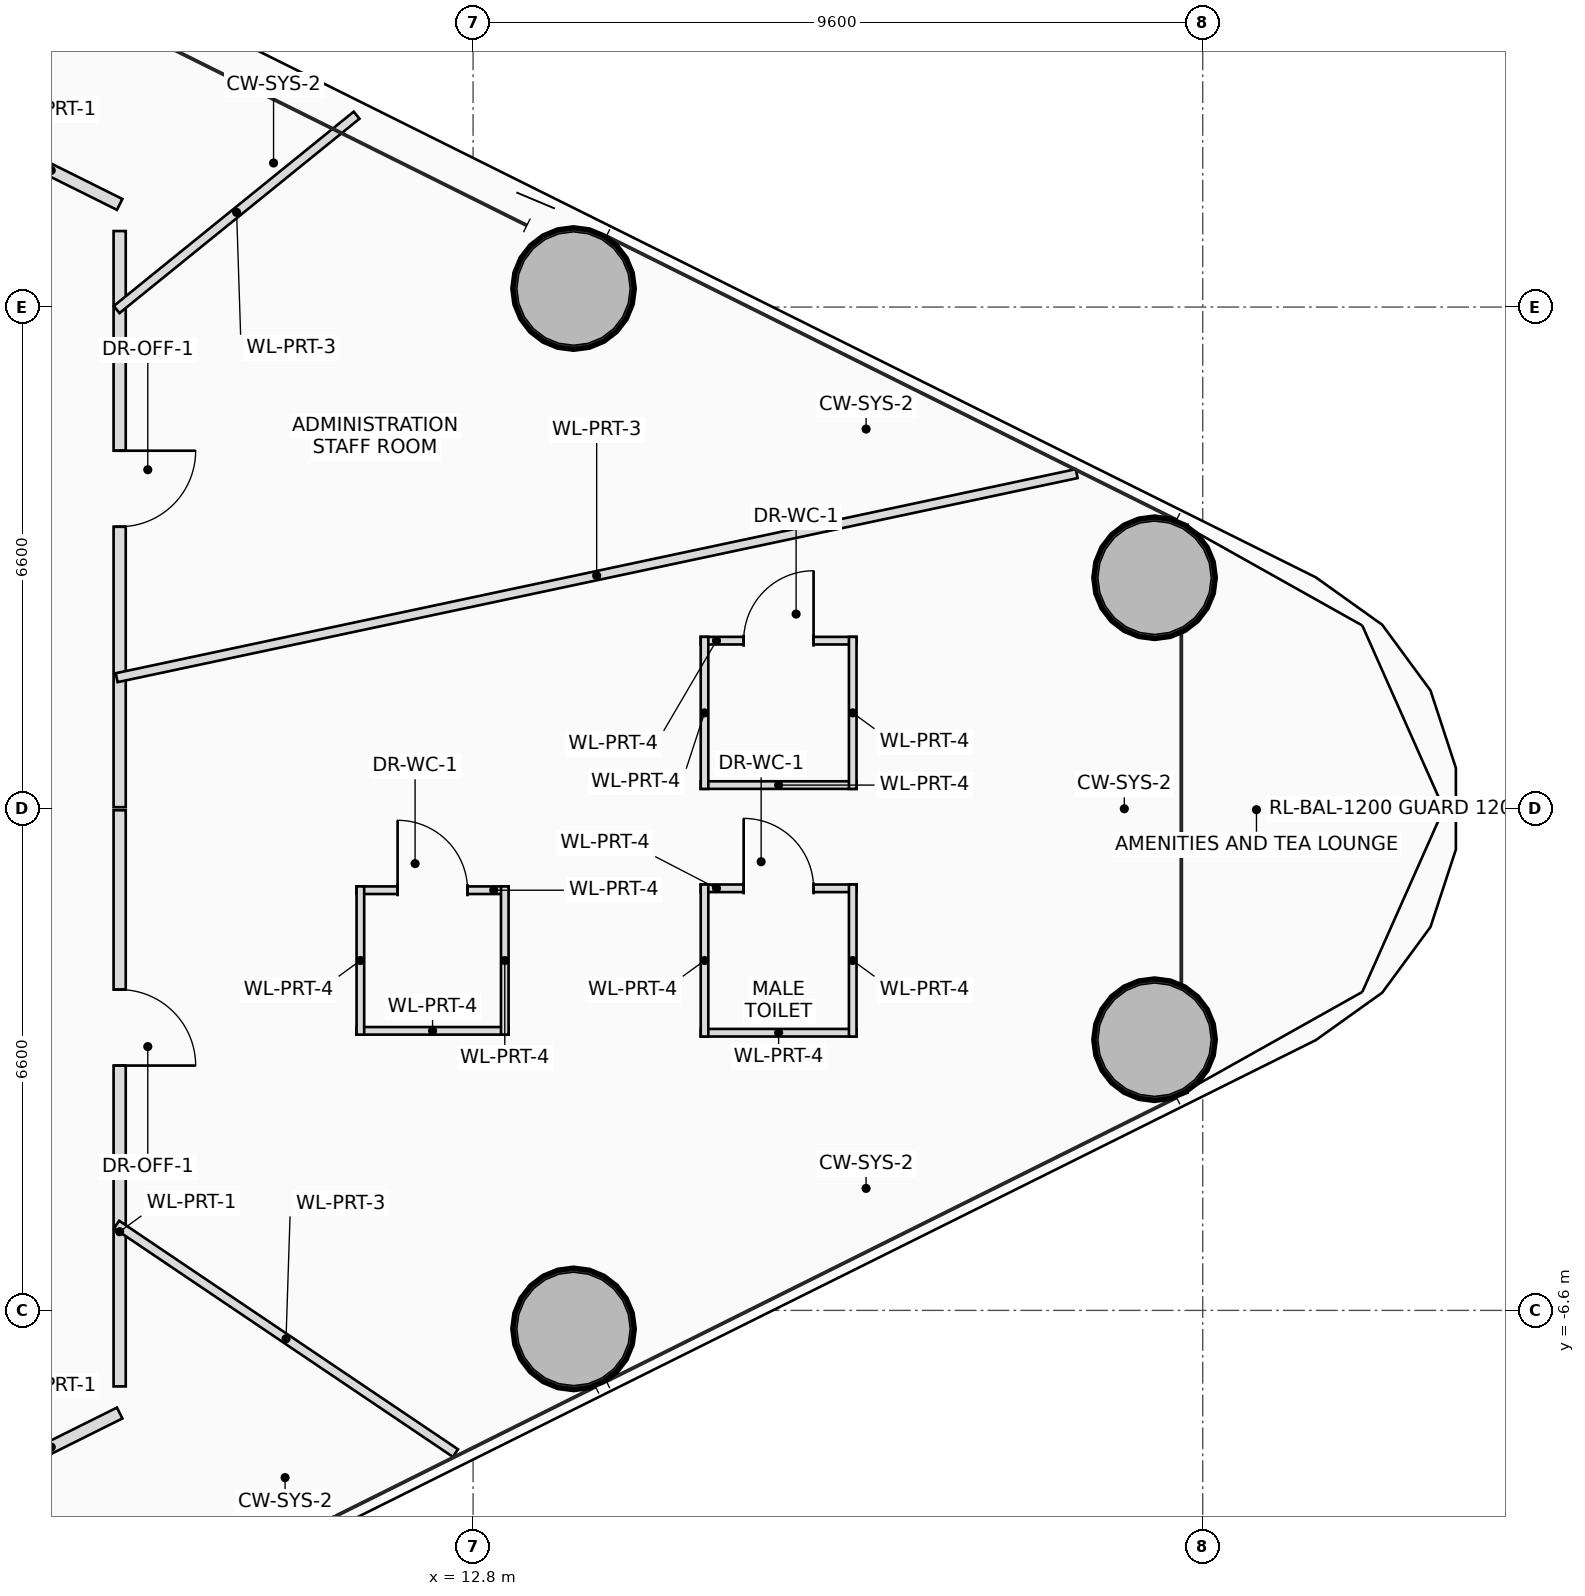
"""IFC4 building model, lengths in metres.
Left out: names, types, materials, properties, quantities, classifications, styles, units other than length and angle.
Written with IfcOpenShell. Run it as: python <this file> out.ifc"""

import sys

from ifc_helpers import new_model, si_unit, direction, frame, frame_2d, origin, origin_2d, place, context, subcontext, project, spatial, rectangle, hollow_circle, extrude, source, transform, mapped, element, fill, save


model = new_model("IFC4")
c1 = context("Model", 3, precision=1e-05, world=origin(), true_north=direction((0.0, 1.0)))
c2 = subcontext(c1, "Body", "Model", "MODEL_VIEW")
j1 = project(units=[si_unit("LENGTHUNIT", "METRE"), si_unit("PLANEANGLEUNIT", "RADIAN")], contexts=[c1])
p1 = place(None, origin())
s1 = spatial("IfcSite", under=j1, at=p1, CompositionType="ELEMENT")
p2 = place(p1, origin())
s2 = spatial("IfcBuilding", under=s1, at=p2, CompositionType="ELEMENT")
p3 = place(p2, frame((0.0, 0.0, 46.0)))
s3 = spatial("IfcBuildingStorey", under=s2, at=p3, CompositionType="ELEMENT", Elevation=46.0)
m1 = source(origin(), c2, "Body", "SweptSolid", [
    extrude(hollow_circle(Radius=0.8, WallThickness=0.055, at=origin_2d()), origin(), (0.0, 0.0, 1.0), 3.7),
])
for number, where, z_axis, x_axis in (
    (1, (14.122, -6.844, 0.0), (0.0, 0.0, 1.0), (1.0, 0.0, 0.0)),
    (2, (21.766, -3.039, 0.0), (0.0, 0.0, 1.0), (1.0, 0.0, 0.0)),
    (3, (21.766, 3.039, 0.0), (0.0, 0.0, 1.0), (1.0, 0.0, 0.0)),
    (4, (14.122, 6.844, 0.0), (0.0, 0.0, 1.0), (1.0, 0.0, 0.0)),
    (5, (6.477, 10.648, 0.0), (0.0, 0.0, 1.0), (1.0, 0.0, 0.0)),
):
    element("IfcColumn", number, at=place(p3, frame(where, z_axis=z_axis, x_axis=x_axis)), inside=s3, PredefinedType="COLUMN", context=c2, shape_type="MappedRepresentation", body=[
        mapped(m1, transform((0.0, 0.0, 0.0), scale=1.0)),
    ])
p4 = place(p3, frame((15.795, -1.047, 0.0), z_axis=(0.0, 0.0, 1.0), x_axis=(1.0, 0.0, 0.0)))
e6 = element("IfcWall", 6, at=p4, inside=s3, PredefinedType="PARTITIONING", context=c2, shape_type="SweptSolid", body=[
    extrude(rectangle(XDim=2.05, YDim=0.1, at=frame_2d((1.025, 0.0))), origin(), (0.0, 0.0, 1.0), 3.115),
])
p5 = place(p4, frame((0.565, 0.0, 0.0)))
e7 = element("IfcOpeningElement", 7, at=p5, cuts=e6, PredefinedType="OPENING", context=c2, shape_type="SweptSolid", body=[
    extrude(rectangle(XDim=0.92, YDim=2.1, at=frame_2d((0.46, 1.05))), frame((0.0, 0.06, 0.0), z_axis=(0.0, -1.0, 0.0), x_axis=(1.0, 0.0, 0.0)), (0.0, 0.0, 1.0), 0.12),
])
p6 = place(p3, frame((17.845, -2.947, 0.0), z_axis=(0.0, 0.0, 1.0), x_axis=(-1.0, 0.0, 0.0)))
e8 = element("IfcWall", 8, at=p6, inside=s3, PredefinedType="PARTITIONING", context=c2, shape_type="SweptSolid", body=[
    extrude(rectangle(XDim=2.05, YDim=0.1, at=frame_2d((1.025, 0.0))), origin(), (0.0, 0.0, 1.0), 3.115),
])
p7 = place(p3, frame((17.795, -0.997, 0.0), z_axis=(0.0, 0.0, 1.0), x_axis=(0.0, -1.0, 0.0)))
e9 = element("IfcWall", 9, at=p7, inside=s3, PredefinedType="PARTITIONING", context=c2, shape_type="SweptSolid", body=[
    extrude(rectangle(XDim=2.0, YDim=0.1, at=frame_2d((1.0, 0.0))), origin(), (0.0, 0.0, 1.0), 3.115),
])
p8 = place(p3, frame((15.845, -2.997, 0.0), z_axis=(0.0, 0.0, 1.0), x_axis=(0.0, 1.0, 0.0)))
e10 = element("IfcWall", 10, at=p8, inside=s3, PredefinedType="PARTITIONING", context=c2, shape_type="SweptSolid", body=[
    extrude(rectangle(XDim=2.0, YDim=0.1, at=frame_2d((1.0, 0.0))), origin(), (0.0, 0.0, 1.0), 3.46),
])
p9 = place(p3, frame((15.795, 2.211, 0.0), z_axis=(0.0, 0.0, 1.0), x_axis=(1.0, 0.0, 0.0)))
e11 = element("IfcWall", 11, at=p9, inside=s3, PredefinedType="PARTITIONING", context=c2, shape_type="SweptSolid", body=[
    extrude(rectangle(XDim=2.05, YDim=0.1, at=frame_2d((1.025, 0.0))), origin(), (0.0, 0.0, 1.0), 3.115),
])
p10 = place(p9, frame((0.565, 0.0, 0.0)))
e12 = element("IfcOpeningElement", 12, at=p10, cuts=e11, PredefinedType="OPENING", context=c2, shape_type="SweptSolid", body=[
    extrude(rectangle(XDim=0.92, YDim=2.1, at=frame_2d((0.46, 1.05))), frame((0.0, 0.06, 0.0), z_axis=(0.0, -1.0, 0.0), x_axis=(1.0, 0.0, 0.0)), (0.0, 0.0, 1.0), 0.12),
])
p11 = place(p3, frame((17.845, 0.311, 0.0), z_axis=(0.0, 0.0, 1.0), x_axis=(-1.0, 0.0, 0.0)))
e13 = element("IfcWall", 13, at=p11, inside=s3, PredefinedType="PARTITIONING", context=c2, shape_type="SweptSolid", body=[
    extrude(rectangle(XDim=2.05, YDim=0.1, at=frame_2d((1.025, 0.0))), origin(), (0.0, 0.0, 1.0), 3.115),
])
p12 = place(p3, frame((17.795, 2.261, 0.0), z_axis=(0.0, 0.0, 1.0), x_axis=(0.0, -1.0, 0.0)))
e14 = element("IfcWall", 14, at=p12, inside=s3, PredefinedType="PARTITIONING", context=c2, shape_type="SweptSolid", body=[
    extrude(rectangle(XDim=2.0, YDim=0.1, at=frame_2d((1.0, 0.0))), origin(), (0.0, 0.0, 1.0), 3.115),
])
p13 = place(p3, frame((15.845, 0.261, 0.0), z_axis=(0.0, 0.0, 1.0), x_axis=(0.0, 1.0, 0.0)))
e15 = element("IfcWall", 15, at=p13, inside=s3, PredefinedType="PARTITIONING", context=c2, shape_type="SweptSolid", body=[
    extrude(rectangle(XDim=2.0, YDim=0.1, at=frame_2d((1.0, 0.0))), origin(), (0.0, 0.0, 1.0), 3.46),
])
p14 = place(p3, frame((11.267, -1.072, 0.0), z_axis=(0.0, 0.0, 1.0), x_axis=(1.0, 0.0, 0.0)))
e16 = element("IfcWall", 16, at=p14, inside=s3, PredefinedType="PARTITIONING", context=c2, shape_type="SweptSolid", body=[
    extrude(rectangle(XDim=2.0, YDim=0.1, at=frame_2d((1.0, 0.0))), origin(), (0.0, 0.0, 1.0), 3.115),
])
p15 = place(p14, frame((0.54, 0.0, 0.0)))
e17 = element("IfcOpeningElement", 17, at=p15, cuts=e16, PredefinedType="OPENING", context=c2, shape_type="SweptSolid", body=[
    extrude(rectangle(XDim=0.92, YDim=2.1, at=frame_2d((0.46, 1.05))), frame((0.0, 0.06, 0.0), z_axis=(0.0, -1.0, 0.0), x_axis=(1.0, 0.0, 0.0)), (0.0, 0.0, 1.0), 0.12),
])
p16 = place(p3, frame((13.267, -2.922, 0.0), z_axis=(0.0, 0.0, 1.0), x_axis=(-1.0, 0.0, 0.0)))
e18 = element("IfcWall", 18, at=p16, inside=s3, PredefinedType="PARTITIONING", context=c2, shape_type="SweptSolid", body=[
    extrude(rectangle(XDim=2.0, YDim=0.1, at=frame_2d((1.0, 0.0))), origin(), (0.0, 0.0, 1.0), 3.115),
])
for number, where, z_axis, x_axis in (
    (19, (13.217, -1.022, 0.0), (0.0, 0.0, 1.0), (0.0, -1.0, 0.0)),
    (20, (11.317, -2.972, 0.0), (0.0, 0.0, 1.0), (0.0, 1.0, 0.0)),
):
    element("IfcWall", number, at=place(p3, frame(where, z_axis=z_axis, x_axis=x_axis)), inside=s3, PredefinedType="PARTITIONING", context=c2, shape_type="SweptSolid", body=[
        extrude(rectangle(XDim=1.95, YDim=0.1, at=frame_2d((0.975, 0.0))), origin(), (0.0, 0.0, 1.0), 3.46),
    ])
p17 = place(p3, frame((6.35, 8.846, 0.0), z_axis=(0.0, 0.0, 1.0), x_axis=(0.895251454268, -0.445561256879, 0.0)))
e21 = element("IfcWall", 21, at=p17, inside=s3, PredefinedType="PARTITIONING", context=c2, shape_type="SweptSolid", body=[
    extrude(rectangle(XDim=2.01, YDim=0.16, at=frame_2d((1.005, 0.0))), origin(), (0.0, 0.0, 1.0), 2.765),
])
p18 = place(p3, frame((8.15, 7.6, 0.0), z_axis=(0.0, 0.0, 1.0), x_axis=(0.0, -1.0, 0.0)))
e22 = element("IfcWall", 22, at=p18, inside=s3, PredefinedType="PARTITIONING", context=c2, shape_type="SweptSolid", body=[
    extrude(rectangle(XDim=7.58, YDim=0.16, at=frame_2d((3.79, 0.0))), origin(), (0.0, 0.0, 1.0), 2.765),
])
p19 = place(p18, frame((2.89, 0.0, 0.0)))
e23 = element("IfcOpeningElement", 23, at=p19, cuts=e22, PredefinedType="OPENING", context=c2, shape_type="SweptSolid", body=[
    extrude(rectangle(XDim=1.0, YDim=2.25, at=frame_2d((0.5, 1.125))), frame((0.0, 0.09, 0.0), z_axis=(0.0, -1.0, 0.0), x_axis=(1.0, 0.0, 0.0)), (0.0, 0.0, 1.0), 0.18),
])
p20 = place(p3, frame((8.15, -0.02, 0.0), z_axis=(0.0, 0.0, 1.0), x_axis=(0.0, -1.0, 0.0)))
e24 = element("IfcWall", 24, at=p20, inside=s3, PredefinedType="PARTITIONING", context=c2, shape_type="SweptSolid", body=[
    extrude(rectangle(XDim=7.58, YDim=0.16, at=frame_2d((3.79, 0.0))), origin(), (0.0, 0.0, 1.0), 2.765),
])
p21 = place(p20, frame((2.359, 0.0, 0.0)))
e25 = element("IfcOpeningElement", 25, at=p21, cuts=e24, PredefinedType="OPENING", context=c2, shape_type="SweptSolid", body=[
    extrude(rectangle(XDim=1.0, YDim=2.25, at=frame_2d((0.5, 1.125))), frame((0.0, 0.09, 0.0), z_axis=(0.0, -1.0, 0.0), x_axis=(1.0, 0.0, 0.0)), (0.0, 0.0, 1.0), 0.18),
])
p22 = place(p3, frame((8.15, -7.95, 0.0), z_axis=(0.0, 0.0, 1.0), x_axis=(-0.895251454268, -0.445561256879, 0.0)))
e26 = element("IfcWall", 26, at=p22, inside=s3, PredefinedType="PARTITIONING", context=c2, shape_type="SweptSolid", body=[
    extrude(rectangle(XDim=2.01, YDim=0.16, at=frame_2d((1.005, 0.0))), origin(), (0.0, 0.0, 1.0), 2.765),
])
p23 = place(p3, frame((8.11, 6.567, 0.0), z_axis=(0.0, 0.0, 1.0), x_axis=(0.777144107081, 0.629322681007, 0.0)))
e27 = element("IfcWall", 27, at=p23, inside=s3, PredefinedType="PARTITIONING", context=c2, shape_type="SweptSolid", body=[
    extrude(rectangle(XDim=4.063, YDim=0.12, at=frame_2d((2.031, 0.0))), origin(), (0.0, 0.0, 1.0), 2.925),
])
p24 = place(p3, frame((8.11, -5.47, 0.0), z_axis=(0.0, 0.0, 1.0), x_axis=(0.829034436431, -0.559197552938, 0.0)))
e28 = element("IfcWall", 28, at=p24, inside=s3, PredefinedType="PARTITIONING", context=c2, shape_type="SweptSolid", body=[
    extrude(rectangle(XDim=5.377, YDim=0.12, at=frame_2d((2.688, 0.0))), origin(), (0.0, 0.0, 1.0), 2.765),
])
p25 = place(p3, frame((8.11, 1.724, 0.0), z_axis=(0.0, 0.0, 1.0), x_axis=(0.978149384457, 0.207903298882, 0.0)))
e29 = element("IfcWall", 29, at=p25, inside=s3, PredefinedType="PARTITIONING", context=c2, shape_type="SweptSolid", body=[
    extrude(rectangle(XDim=12.914, YDim=0.12, at=frame_2d((6.457, 0.0))), origin(), (0.0, 0.0, 1.0), 2.765),
])
p26 = place(p5, origin())
e30 = element("IfcDoor", 30, at=p26, inside=s3, OperationType="SINGLE_SWING_LEFT", PredefinedType="DOOR", context=c2, shape_type="SweptSolid", body=[
    extrude(rectangle(XDim=0.92, YDim=2.1, at=frame_2d((0.46, 1.05))), frame((0.0, 0.025, 0.0), z_axis=(0.0, -1.0, 0.0), x_axis=(1.0, 0.0, 0.0)), (0.0, 0.0, 1.0), 0.05),
])
fill(e7, e30)
p27 = place(p10, origin())
e31 = element("IfcDoor", 31, at=p27, inside=s3, OperationType="SINGLE_SWING_RIGHT", PredefinedType="DOOR", context=c2, shape_type="SweptSolid", body=[
    extrude(rectangle(XDim=0.92, YDim=2.1, at=frame_2d((0.46, 1.05))), frame((0.0, 0.025, 0.0), z_axis=(0.0, -1.0, 0.0), x_axis=(1.0, 0.0, 0.0)), (0.0, 0.0, 1.0), 0.05),
])
fill(e12, e31)
p28 = place(p15, origin())
e32 = element("IfcDoor", 32, at=p28, inside=s3, OperationType="SINGLE_SWING_LEFT", PredefinedType="DOOR", context=c2, shape_type="SweptSolid", body=[
    extrude(rectangle(XDim=0.92, YDim=2.1, at=frame_2d((0.46, 1.05))), frame((0.0, 0.025, 0.0), z_axis=(0.0, -1.0, 0.0), x_axis=(1.0, 0.0, 0.0)), (0.0, 0.0, 1.0), 0.05),
])
fill(e17, e32)
p29 = place(p19, origin())
e33 = element("IfcDoor", 33, at=p29, inside=s3, OperationType="SINGLE_SWING_LEFT", PredefinedType="DOOR", context=c2, shape_type="SweptSolid", body=[
    extrude(rectangle(XDim=1.0, YDim=2.25, at=frame_2d((0.5, 1.125))), frame((0.0, 0.025, 0.0), z_axis=(0.0, -1.0, 0.0), x_axis=(1.0, 0.0, 0.0)), (0.0, 0.0, 1.0), 0.05),
])
fill(e23, e33)
p30 = place(p21, origin())
e34 = element("IfcDoor", 34, at=p30, inside=s3, OperationType="SINGLE_SWING_RIGHT", PredefinedType="DOOR", context=c2, shape_type="SweptSolid", body=[
    extrude(rectangle(XDim=1.0, YDim=2.25, at=frame_2d((0.5, 1.125))), frame((0.0, 0.025, 0.0), z_axis=(0.0, -1.0, 0.0), x_axis=(1.0, 0.0, 0.0)), (0.0, 0.0, 1.0), 0.05),
])
fill(e25, e34)
save(model, sys.argv[1])
